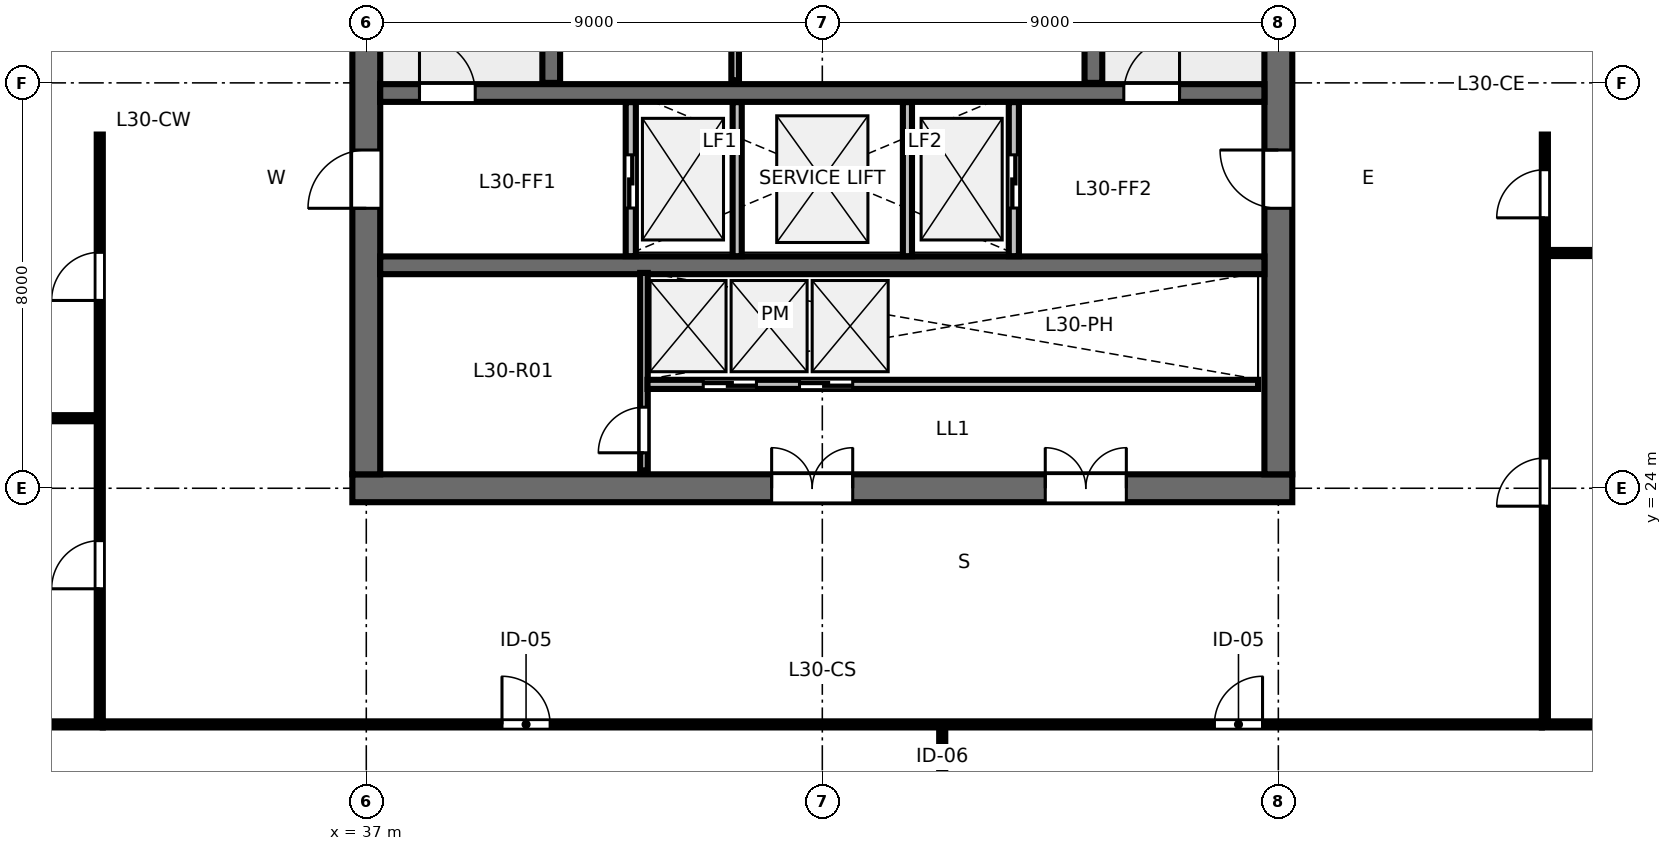
"""IFC4 building model, lengths in metres.
Left out: names, types, materials, properties, quantities, classifications, styles, units other than length and angle.
Written with IfcOpenShell. Run it as: python <this file> out.ifc"""

import sys

from ifc_helpers import new_model, si_unit, direction, frame, frame_2d, origin, place, context, subcontext, project, spatial, rectangle, extrude, element, fill, save


model = new_model("IFC4")
c1 = context("Model", 3, precision=1e-05, world=origin(), true_north=direction((0.0, 1.0)))
c2 = subcontext(c1, "Body", "Model", "MODEL_VIEW")
j1 = project(units=[si_unit("LENGTHUNIT", "METRE"), si_unit("PLANEANGLEUNIT", "RADIAN")], contexts=[c1])
p1 = place(None, origin())
s1 = spatial("IfcSite", under=j1, at=p1, CompositionType="ELEMENT")
p2 = place(p1, origin())
s2 = spatial("IfcBuilding", under=s1, at=p2, CompositionType="ELEMENT")
p3 = place(p2, frame((0.0, 0.0, 116.8)))
s3 = spatial("IfcBuildingStorey", under=s2, at=p3, CompositionType="ELEMENT", Elevation=116.8)
p4 = place(p3, frame((36.725, 24.0, 0.0), z_axis=(0.0, 0.0, 1.0), x_axis=(1.0, 0.0, 0.0)))
e1 = element("IfcWall", 1, at=p4, inside=s3, PredefinedType="SHEAR", context=c2, shape_type="SweptSolid", body=[
    extrude(rectangle(XDim=18.55, YDim=0.55, at=frame_2d((9.275, 0.0))), origin(), (0.0, 0.0, 1.0), 3.36),
])
p5 = place(p4, frame((8.275, 0.0, 0.0)))
e2 = element("IfcOpeningElement", 2, at=p5, cuts=e1, PredefinedType="OPENING", context=c2, shape_type="SweptSolid", body=[
    extrude(rectangle(XDim=1.6, YDim=2.15, at=frame_2d((0.8, 1.075))), frame((0.0, 0.285, 0.0), z_axis=(0.0, -1.0, 0.0), x_axis=(1.0, 0.0, 0.0)), (0.0, 0.0, 1.0), 0.57),
])
p6 = place(p4, frame((13.675, 0.0, 0.0)))
e3 = element("IfcOpeningElement", 3, at=p6, cuts=e1, PredefinedType="OPENING", context=c2, shape_type="SweptSolid", body=[
    extrude(rectangle(XDim=1.6, YDim=2.15, at=frame_2d((0.8, 1.075))), frame((0.0, 0.285, 0.0), z_axis=(0.0, -1.0, 0.0), x_axis=(1.0, 0.0, 0.0)), (0.0, 0.0, 1.0), 0.57),
])
p7 = place(p3, frame((37.0, 24.275, 0.0), z_axis=(0.0, 0.0, 1.0), x_axis=(0.0, 1.0, 0.0)))
e4 = element("IfcWall", 4, at=p7, inside=s3, PredefinedType="SHEAR", context=c2, shape_type="SweptSolid", body=[
    extrude(rectangle(XDim=15.45, YDim=0.55, at=frame_2d((7.725, 0.0))), origin(), (0.0, 0.0, 1.0), 3.36),
])
p8 = place(p7, frame((5.25, 0.0, 0.0)))
e5 = element("IfcOpeningElement", 5, at=p8, cuts=e4, PredefinedType="OPENING", context=c2, shape_type="SweptSolid", body=[
    extrude(rectangle(XDim=1.15, YDim=2.15, at=frame_2d((0.575, 1.075))), frame((0.0, 0.285, 0.0), z_axis=(0.0, -1.0, 0.0), x_axis=(1.0, 0.0, 0.0)), (0.0, 0.0, 1.0), 0.57),
])
p9 = place(p3, frame((55.0, 24.275, 0.0), z_axis=(0.0, 0.0, 1.0), x_axis=(0.0, 1.0, 0.0)))
e6 = element("IfcWall", 6, at=p9, inside=s3, PredefinedType="SHEAR", context=c2, shape_type="SweptSolid", body=[
    extrude(rectangle(XDim=15.45, YDim=0.55, at=frame_2d((7.725, 0.0))), origin(), (0.0, 0.0, 1.0), 3.36),
])
p10 = place(p9, frame((5.25, 0.0, 0.0)))
e7 = element("IfcOpeningElement", 7, at=p10, cuts=e6, PredefinedType="OPENING", context=c2, shape_type="SweptSolid", body=[
    extrude(rectangle(XDim=1.15, YDim=2.15, at=frame_2d((0.575, 1.075))), frame((0.0, 0.285, 0.0), z_axis=(0.0, -1.0, 0.0), x_axis=(1.0, 0.0, 0.0)), (0.0, 0.0, 1.0), 0.57),
])
p11 = place(p3, frame((37.275, 31.8, 0.0), z_axis=(0.0, 0.0, 1.0), x_axis=(1.0, 0.0, 0.0)))
e8 = element("IfcWall", 8, at=p11, inside=s3, PredefinedType="SHEAR", context=c2, shape_type="SweptSolid", body=[
    extrude(rectangle(XDim=17.45, YDim=0.35, at=frame_2d((8.725, 0.0))), origin(), (0.0, 0.0, 1.0), 3.36),
])
p12 = place(p11, frame((0.775, 0.0, 0.0)))
e9 = element("IfcOpeningElement", 9, at=p12, cuts=e8, PredefinedType="OPENING", context=c2, shape_type="SweptSolid", body=[
    extrude(rectangle(XDim=1.1, YDim=2.15, at=frame_2d((0.55, 1.075))), frame((0.0, 0.185, 0.0), z_axis=(0.0, -1.0, 0.0), x_axis=(1.0, 0.0, 0.0)), (0.0, 0.0, 1.0), 0.37),
])
p13 = place(p11, frame((14.675, 0.0, 0.0)))
e10 = element("IfcOpeningElement", 10, at=p13, cuts=e8, PredefinedType="OPENING", context=c2, shape_type="SweptSolid", body=[
    extrude(rectangle(XDim=1.1, YDim=2.15, at=frame_2d((0.55, 1.075))), frame((0.0, 0.185, 0.0), z_axis=(0.0, -1.0, 0.0), x_axis=(1.0, 0.0, 0.0)), (0.0, 0.0, 1.0), 0.37),
])
p14 = place(p3, frame((37.275, 28.4, 0.0), z_axis=(0.0, 0.0, 1.0), x_axis=(1.0, 0.0, 0.0)))
e11 = element("IfcWall", 11, at=p14, inside=s3, PredefinedType="SHEAR", context=c2, shape_type="SweptSolid", body=[
    extrude(rectangle(XDim=17.45, YDim=0.35, at=frame_2d((8.725, 0.0))), origin(), (0.0, 0.0, 1.0), 3.36),
])
for number, where, z_axis, x_axis in (
    (12, (40.65, 32.0, 0.0), (0.0, 0.0, 1.0), (0.0, 1.0, 0.0)),
    (13, (51.35, 32.0, 0.0), (0.0, 0.0, 1.0), (0.0, 1.0, 0.0)),
):
    element("IfcWall", number, at=place(p3, frame(where, z_axis=z_axis, x_axis=x_axis)), inside=s3, PredefinedType="SHEAR", context=c2, shape_type="SweptSolid", body=[
        extrude(rectangle(XDim=7.7, YDim=0.35, at=frame_2d((3.85, 0.0))), origin(), (0.0, 0.0, 1.0), 3.6),
    ])
p15 = place(p3, frame((44.28, 32.05, 0.0), z_axis=(0.0, 0.0, 1.0), x_axis=(0.0, 1.0, 0.0)))
e14 = element("IfcWall", 14, at=p15, inside=s3, PredefinedType="PARTITIONING", context=c2, shape_type="SweptSolid", body=[
    extrude(rectangle(XDim=3.67, YDim=0.15, at=frame_2d((1.835, 0.0))), origin(), (0.0, 0.0, 1.0), 3.36),
])
p16 = place(p15, frame((1.35, 0.0, 0.0)))
e15 = element("IfcOpeningElement", 15, at=p16, cuts=e14, PredefinedType="OPENING", context=c2, shape_type="SweptSolid", body=[
    extrude(rectangle(XDim=0.92, YDim=2.15, at=frame_2d((0.46, 1.075))), frame((0.0, 0.085, 0.0), z_axis=(0.0, -1.0, 0.0), x_axis=(1.0, 0.0, 0.0)), (0.0, 0.0, 1.0), 0.17),
])
p17 = place(p3, frame((42.22, 28.58, 0.0), z_axis=(0.0, 0.0, 1.0), x_axis=(0.0, 1.0, 0.0)))
e16 = element("IfcWall", 16, at=p17, inside=s3, PredefinedType="PARTITIONING", context=c2, shape_type="SweptSolid", body=[
    extrude(rectangle(XDim=3.04, YDim=0.2, at=frame_2d((1.52, 0.0))), origin(), (0.0, 0.0, 1.0), 3.36),
])
p18 = place(p17, frame((0.95, 0.0, 0.0)))
e17 = element("IfcOpeningElement", 17, at=p18, cuts=e16, PredefinedType="OPENING", context=c2, shape_type="SweptSolid", body=[
    extrude(rectangle(XDim=1.05, YDim=2.15, at=frame_2d((0.525, 1.075))), frame((0.0, 0.11, 0.0), z_axis=(0.0, -1.0, 0.0), x_axis=(1.0, 0.0, 0.0)), (0.0, 0.0, 1.0), 0.22),
])
p19 = place(p3, frame((49.78, 28.58, 0.0), z_axis=(0.0, 0.0, 1.0), x_axis=(0.0, 1.0, 0.0)))
e18 = element("IfcWall", 18, at=p19, inside=s3, PredefinedType="PARTITIONING", context=c2, shape_type="SweptSolid", body=[
    extrude(rectangle(XDim=3.04, YDim=0.2, at=frame_2d((1.52, 0.0))), origin(), (0.0, 0.0, 1.0), 3.36),
])
p20 = place(p19, frame((0.95, 0.0, 0.0)))
e19 = element("IfcOpeningElement", 19, at=p20, cuts=e18, PredefinedType="OPENING", context=c2, shape_type="SweptSolid", body=[
    extrude(rectangle(XDim=1.05, YDim=2.15, at=frame_2d((0.525, 1.075))), frame((0.0, 0.11, 0.0), z_axis=(0.0, -1.0, 0.0), x_axis=(1.0, 0.0, 0.0)), (0.0, 0.0, 1.0), 0.22),
])
for number, where, z_axis, x_axis in (
    (20, (44.32, 28.58, 0.0), (0.0, 0.0, 1.0), (0.0, 1.0, 0.0)),
    (21, (47.68, 28.58, 0.0), (0.0, 0.0, 1.0), (0.0, 1.0, 0.0)),
):
    element("IfcWall", number, at=place(p3, frame(where, z_axis=z_axis, x_axis=x_axis)), inside=s3, PredefinedType="PARTITIONING", context=c2, shape_type="SweptSolid", body=[
        extrude(rectangle(XDim=3.04, YDim=0.18, at=frame_2d((1.52, 0.0))), origin(), (0.0, 0.0, 1.0), 3.36),
    ])
p21 = place(p3, frame((42.48, 24.35, 0.0), z_axis=(0.0, 0.0, 1.0), x_axis=(0.0, 1.0, 0.0)))
e22 = element("IfcWall", 22, at=p21, inside=s3, PredefinedType="PARTITIONING", context=c2, shape_type="SweptSolid", body=[
    extrude(rectangle(XDim=3.9, YDim=0.15, at=frame_2d((1.95, 0.0))), origin(), (0.0, 0.0, 1.0), 3.36),
])
p22 = place(p21, frame((0.35, 0.0, 0.0)))
e23 = element("IfcOpeningElement", 23, at=p22, cuts=e22, PredefinedType="OPENING", context=c2, shape_type="SweptSolid", body=[
    extrude(rectangle(XDim=0.9, YDim=2.15, at=frame_2d((0.45, 1.075))), frame((0.0, 0.085, 0.0), z_axis=(0.0, -1.0, 0.0), x_axis=(1.0, 0.0, 0.0)), (0.0, 0.0, 1.0), 0.17),
])
p23 = place(p3, frame((42.55, 26.05, 0.0), z_axis=(0.0, 0.0, 1.0), x_axis=(1.0, 0.0, 0.0)))
e24 = element("IfcWall", 24, at=p23, inside=s3, PredefinedType="PARTITIONING", context=c2, shape_type="SweptSolid", body=[
    extrude(rectangle(XDim=12.05, YDim=0.18, at=frame_2d((6.025, 0.0))), origin(), (0.0, 0.0, 1.0), 3.36),
])
p24 = place(p23, frame((1.1, 0.0, 0.0)))
e25 = element("IfcOpeningElement", 25, at=p24, cuts=e24, PredefinedType="OPENING", context=c2, shape_type="SweptSolid", body=[
    extrude(rectangle(XDim=1.05, YDim=2.15, at=frame_2d((0.525, 1.075))), frame((0.0, 0.1, 0.0), z_axis=(0.0, -1.0, 0.0), x_axis=(1.0, 0.0, 0.0)), (0.0, 0.0, 1.0), 0.2),
])
p25 = place(p23, frame((3.0, 0.0, 0.0)))
e26 = element("IfcOpeningElement", 26, at=p25, cuts=e24, PredefinedType="OPENING", context=c2, shape_type="SweptSolid", body=[
    extrude(rectangle(XDim=1.05, YDim=2.15, at=frame_2d((0.525, 1.075))), frame((0.0, 0.1, 0.0), z_axis=(0.0, -1.0, 0.0), x_axis=(1.0, 0.0, 0.0)), (0.0, 0.0, 1.0), 0.2),
])
p26 = place(p3, frame((48.366, 19.34, 0.0), z_axis=(0.0, 0.0, 1.0), x_axis=(0.0, -1.0, 0.0)))
e27 = element("IfcWall", 27, at=p26, inside=s3, PredefinedType="PARTITIONING", context=c2, shape_type="SweptSolid", body=[
    extrude(rectangle(XDim=6.96, YDim=0.12, at=frame_2d((3.48, 0.0))), origin(), (0.0, 0.0, 1.0), 2.64),
])
p27 = place(p26, frame((1.4, 0.0, 0.0)))
e28 = element("IfcOpeningElement", 28, at=p27, cuts=e27, PredefinedType="OPENING", context=c2, shape_type="SweptSolid", body=[
    extrude(rectangle(XDim=0.9, YDim=2.15, at=frame_2d((0.45, 1.075))), frame((0.0, 0.07, 0.0), z_axis=(0.0, -1.0, 0.0), x_axis=(1.0, 0.0, 0.0)), (0.0, 0.0, 1.0), 0.14),
])
p28 = place(p3, frame((31.8, 19.34, 0.0), z_axis=(0.0, 0.0, 1.0), x_axis=(1.0, 0.0, 0.0)))
e29 = element("IfcWall", 29, at=p28, inside=s3, PredefinedType="PARTITIONING", context=c2, shape_type="SweptSolid", body=[
    extrude(rectangle(XDim=28.4, YDim=0.12, at=frame_2d((14.2, 0.0))), origin(), (0.0, 0.0, 1.0), 2.64),
])
p29 = place(p28, frame((7.878, 0.0, 0.0)))
e30 = element("IfcOpeningElement", 30, at=p29, cuts=e29, PredefinedType="OPENING", context=c2, shape_type="SweptSolid", body=[
    extrude(rectangle(XDim=0.95, YDim=2.15, at=frame_2d((0.475, 1.075))), frame((0.0, 0.07, 0.0), z_axis=(0.0, -1.0, 0.0), x_axis=(1.0, 0.0, 0.0)), (0.0, 0.0, 1.0), 0.14),
])
p30 = place(p28, frame((21.938, 0.0, 0.0)))
e31 = element("IfcOpeningElement", 31, at=p30, cuts=e29, PredefinedType="OPENING", context=c2, shape_type="SweptSolid", body=[
    extrude(rectangle(XDim=0.95, YDim=2.15, at=frame_2d((0.475, 1.075))), frame((0.0, 0.07, 0.0), z_axis=(0.0, -1.0, 0.0), x_axis=(1.0, 0.0, 0.0)), (0.0, 0.0, 1.0), 0.14),
])
p31 = place(p3, frame((31.74, 25.383, 0.0), z_axis=(0.0, 0.0, 1.0), x_axis=(-1.0, 0.0, 0.0)))
e32 = element("IfcWall", 32, at=p31, inside=s3, PredefinedType="PARTITIONING", context=c2, shape_type="SweptSolid", body=[
    extrude(rectangle(XDim=7.96, YDim=0.12, at=frame_2d((3.98, 0.0))), origin(), (0.0, 0.0, 1.0), 2.64),
])
p32 = place(p31, frame((1.4, 0.0, 0.0)))
e33 = element("IfcOpeningElement", 33, at=p32, cuts=e32, PredefinedType="OPENING", context=c2, shape_type="SweptSolid", body=[
    extrude(rectangle(XDim=0.9, YDim=2.15, at=frame_2d((0.45, 1.075))), frame((0.0, 0.07, 0.0), z_axis=(0.0, -1.0, 0.0), x_axis=(1.0, 0.0, 0.0)), (0.0, 0.0, 1.0), 0.14),
])
p33 = place(p3, frame((31.74, 19.4, 0.0), z_axis=(0.0, 0.0, 1.0), x_axis=(0.0, 1.0, 0.0)))
e34 = element("IfcWall", 34, at=p33, inside=s3, PredefinedType="PARTITIONING", context=c2, shape_type="SweptSolid", body=[
    extrude(rectangle(XDim=11.58, YDim=0.12, at=frame_2d((5.79, 0.0))), origin(), (0.0, 0.0, 1.0), 2.64),
])
p34 = place(p33, frame((2.616, 0.0, 0.0)))
e35 = element("IfcOpeningElement", 35, at=p34, cuts=e34, PredefinedType="OPENING", context=c2, shape_type="SweptSolid", body=[
    extrude(rectangle(XDim=0.95, YDim=2.15, at=frame_2d((0.475, 1.075))), frame((0.0, 0.07, 0.0), z_axis=(0.0, -1.0, 0.0), x_axis=(1.0, 0.0, 0.0)), (0.0, 0.0, 1.0), 0.14),
])
p35 = place(p33, frame((8.306, 0.0, 0.0)))
e36 = element("IfcOpeningElement", 36, at=p35, cuts=e34, PredefinedType="OPENING", context=c2, shape_type="SweptSolid", body=[
    extrude(rectangle(XDim=0.95, YDim=2.15, at=frame_2d((0.475, 1.075))), frame((0.0, 0.07, 0.0), z_axis=(0.0, -1.0, 0.0), x_axis=(1.0, 0.0, 0.0)), (0.0, 0.0, 1.0), 0.14),
])
p36 = place(p3, frame((60.26, 28.643, 0.0), z_axis=(0.0, 0.0, 1.0), x_axis=(1.0, 0.0, 0.0)))
e37 = element("IfcWall", 37, at=p36, inside=s3, PredefinedType="PARTITIONING", context=c2, shape_type="SweptSolid", body=[
    extrude(rectangle(XDim=7.96, YDim=0.12, at=frame_2d((3.98, 0.0))), origin(), (0.0, 0.0, 1.0), 2.64),
])
p37 = place(p36, frame((1.4, 0.0, 0.0)))
e38 = element("IfcOpeningElement", 38, at=p37, cuts=e37, PredefinedType="OPENING", context=c2, shape_type="SweptSolid", body=[
    extrude(rectangle(XDim=0.9, YDim=2.15, at=frame_2d((0.45, 1.075))), frame((0.0, 0.07, 0.0), z_axis=(0.0, -1.0, 0.0), x_axis=(1.0, 0.0, 0.0)), (0.0, 0.0, 1.0), 0.14),
])
p38 = place(p3, frame((60.26, 19.4, 0.0), z_axis=(0.0, 0.0, 1.0), x_axis=(0.0, 1.0, 0.0)))
e39 = element("IfcWall", 39, at=p38, inside=s3, PredefinedType="PARTITIONING", context=c2, shape_type="SweptSolid", body=[
    extrude(rectangle(XDim=11.58, YDim=0.12, at=frame_2d((5.79, 0.0))), origin(), (0.0, 0.0, 1.0), 2.64),
])
p39 = place(p38, frame((4.246, 0.0, 0.0)))
e40 = element("IfcOpeningElement", 40, at=p39, cuts=e39, PredefinedType="OPENING", context=c2, shape_type="SweptSolid", body=[
    extrude(rectangle(XDim=0.95, YDim=2.15, at=frame_2d((0.475, 1.075))), frame((0.0, 0.07, 0.0), z_axis=(0.0, -1.0, 0.0), x_axis=(1.0, 0.0, 0.0)), (0.0, 0.0, 1.0), 0.14),
])
p40 = place(p38, frame((9.936, 0.0, 0.0)))
e41 = element("IfcOpeningElement", 41, at=p40, cuts=e39, PredefinedType="OPENING", context=c2, shape_type="SweptSolid", body=[
    extrude(rectangle(XDim=0.95, YDim=2.15, at=frame_2d((0.475, 1.075))), frame((0.0, 0.07, 0.0), z_axis=(0.0, -1.0, 0.0), x_axis=(1.0, 0.0, 0.0)), (0.0, 0.0, 1.0), 0.14),
])
for number, where, z_axis, x_axis in (
    (42, (31.8, 19.34, 0.0), (0.0, 0.0, 1.0), (-1.0, 0.0, 0.0)),
    (43, (60.2, 19.34, 0.0), (0.0, 0.0, 1.0), (1.0, 0.0, 0.0)),
):
    element("IfcWall", number, at=place(p3, frame(where, z_axis=z_axis, x_axis=x_axis)), inside=s3, PredefinedType="PARTITIONING", context=c2, shape_type="SweptSolid", body=[
        extrude(rectangle(XDim=8.02, YDim=0.12, at=frame_2d((4.01, 0.0))), origin(), (0.0, 0.0, 1.0), 2.64),
    ])
p41 = place(p12, origin())
e44 = element("IfcDoor", 44, at=p41, inside=s3, OperationType="SINGLE_SWING_LEFT", PredefinedType="DOOR", context=c2, shape_type="SweptSolid", body=[
    extrude(rectangle(XDim=1.1, YDim=2.15, at=frame_2d((0.55, 1.075))), frame((0.0, 0.025, 0.0), z_axis=(0.0, -1.0, 0.0), x_axis=(1.0, 0.0, 0.0)), (0.0, 0.0, 1.0), 0.05),
])
fill(e9, e44)
p42 = place(p13, origin())
e45 = element("IfcDoor", 45, at=p42, inside=s3, OperationType="SINGLE_SWING_RIGHT", PredefinedType="DOOR", context=c2, shape_type="SweptSolid", body=[
    extrude(rectangle(XDim=1.1, YDim=2.15, at=frame_2d((0.55, 1.075))), frame((0.0, 0.025, 0.0), z_axis=(0.0, -1.0, 0.0), x_axis=(1.0, 0.0, 0.0)), (0.0, 0.0, 1.0), 0.05),
])
fill(e10, e45)
p43 = place(p8, origin())
e46 = element("IfcDoor", 46, at=p43, inside=s3, OperationType="SINGLE_SWING_LEFT", PredefinedType="DOOR", context=c2, shape_type="SweptSolid", body=[
    extrude(rectangle(XDim=1.15, YDim=2.15, at=frame_2d((0.575, 1.075))), frame((0.0, 0.025, 0.0), z_axis=(0.0, -1.0, 0.0), x_axis=(1.0, 0.0, 0.0)), (0.0, 0.0, 1.0), 0.05),
])
fill(e5, e46)
p44 = place(p10, origin())
e47 = element("IfcDoor", 47, at=p44, inside=s3, OperationType="SINGLE_SWING_RIGHT", PredefinedType="DOOR", context=c2, shape_type="SweptSolid", body=[
    extrude(rectangle(XDim=1.15, YDim=2.15, at=frame_2d((0.575, 1.075))), frame((0.0, 0.025, 0.0), z_axis=(0.0, -1.0, 0.0), x_axis=(1.0, 0.0, 0.0)), (0.0, 0.0, 1.0), 0.05),
])
fill(e7, e47)
p45 = place(p5, origin())
e48 = element("IfcDoor", 48, at=p45, inside=s3, OperationType="DOUBLE_DOOR_SINGLE_SWING", PredefinedType="DOOR", context=c2, shape_type="SweptSolid", body=[
    extrude(rectangle(XDim=1.6, YDim=2.15, at=frame_2d((0.8, 1.075))), frame((0.0, 0.025, 0.0), z_axis=(0.0, -1.0, 0.0), x_axis=(1.0, 0.0, 0.0)), (0.0, 0.0, 1.0), 0.05),
])
fill(e2, e48)
p46 = place(p6, origin())
e49 = element("IfcDoor", 49, at=p46, inside=s3, OperationType="DOUBLE_DOOR_SINGLE_SWING", PredefinedType="DOOR", context=c2, shape_type="SweptSolid", body=[
    extrude(rectangle(XDim=1.6, YDim=2.15, at=frame_2d((0.8, 1.075))), frame((0.0, 0.025, 0.0), z_axis=(0.0, -1.0, 0.0), x_axis=(1.0, 0.0, 0.0)), (0.0, 0.0, 1.0), 0.05),
])
fill(e3, e49)
p47 = place(p18, origin())
e50 = element("IfcDoor", 50, at=p47, inside=s3, OperationType="SLIDING_TO_LEFT", PredefinedType="DOOR", context=c2, shape_type="SweptSolid", body=[
    extrude(rectangle(XDim=1.05, YDim=2.15, at=frame_2d((0.525, 1.075))), frame((0.0, 0.025, 0.0), z_axis=(0.0, -1.0, 0.0), x_axis=(1.0, 0.0, 0.0)), (0.0, 0.0, 1.0), 0.05),
])
fill(e17, e50)
p48 = place(p20, origin())
e51 = element("IfcDoor", 51, at=p48, inside=s3, OperationType="SLIDING_TO_RIGHT", PredefinedType="DOOR", context=c2, shape_type="SweptSolid", body=[
    extrude(rectangle(XDim=1.05, YDim=2.15, at=frame_2d((0.525, 1.075))), frame((0.0, 0.025, 0.0), z_axis=(0.0, -1.0, 0.0), x_axis=(1.0, 0.0, 0.0)), (0.0, 0.0, 1.0), 0.05),
])
fill(e19, e51)
p49 = place(p22, origin())
e52 = element("IfcDoor", 52, at=p49, inside=s3, OperationType="SINGLE_SWING_LEFT", PredefinedType="DOOR", context=c2, shape_type="SweptSolid", body=[
    extrude(rectangle(XDim=0.9, YDim=2.15, at=frame_2d((0.45, 1.075))), frame((0.0, 0.025, 0.0), z_axis=(0.0, -1.0, 0.0), x_axis=(1.0, 0.0, 0.0)), (0.0, 0.0, 1.0), 0.05),
])
fill(e23, e52)
p50 = place(p24, origin())
e53 = element("IfcDoor", 53, at=p50, inside=s3, OperationType="SLIDING_TO_LEFT", PredefinedType="DOOR", context=c2, shape_type="SweptSolid", body=[
    extrude(rectangle(XDim=1.05, YDim=2.15, at=frame_2d((0.525, 1.075))), frame((0.0, 0.025, 0.0), z_axis=(0.0, -1.0, 0.0), x_axis=(1.0, 0.0, 0.0)), (0.0, 0.0, 1.0), 0.05),
])
fill(e25, e53)
p51 = place(p25, origin())
e54 = element("IfcDoor", 54, at=p51, inside=s3, OperationType="SLIDING_TO_RIGHT", PredefinedType="DOOR", context=c2, shape_type="SweptSolid", body=[
    extrude(rectangle(XDim=1.05, YDim=2.15, at=frame_2d((0.525, 1.075))), frame((0.0, 0.025, 0.0), z_axis=(0.0, -1.0, 0.0), x_axis=(1.0, 0.0, 0.0)), (0.0, 0.0, 1.0), 0.05),
])
fill(e26, e54)
p52 = place(p29, origin())
e55 = element("IfcDoor", 55, at=p52, inside=s3, OperationType="SINGLE_SWING_LEFT", PredefinedType="DOOR", context=c2, shape_type="SweptSolid", body=[
    extrude(rectangle(XDim=0.95, YDim=2.15, at=frame_2d((0.475, 1.075))), frame((0.0, 0.025, 0.0), z_axis=(0.0, -1.0, 0.0), x_axis=(1.0, 0.0, 0.0)), (0.0, 0.0, 1.0), 0.05),
])
fill(e30, e55)
p53 = place(p30, origin())
e56 = element("IfcDoor", 56, at=p53, inside=s3, OperationType="SINGLE_SWING_RIGHT", PredefinedType="DOOR", context=c2, shape_type="SweptSolid", body=[
    extrude(rectangle(XDim=0.95, YDim=2.15, at=frame_2d((0.475, 1.075))), frame((0.0, 0.025, 0.0), z_axis=(0.0, -1.0, 0.0), x_axis=(1.0, 0.0, 0.0)), (0.0, 0.0, 1.0), 0.05),
])
fill(e31, e56)
p54 = place(p34, origin())
e57 = element("IfcDoor", 57, at=p54, inside=s3, OperationType="SINGLE_SWING_LEFT", PredefinedType="DOOR", context=c2, shape_type="SweptSolid", body=[
    extrude(rectangle(XDim=0.95, YDim=2.15, at=frame_2d((0.475, 1.075))), frame((0.0, 0.025, 0.0), z_axis=(0.0, -1.0, 0.0), x_axis=(1.0, 0.0, 0.0)), (0.0, 0.0, 1.0), 0.05),
])
fill(e35, e57)
p55 = place(p35, origin())
e58 = element("IfcDoor", 58, at=p55, inside=s3, OperationType="SINGLE_SWING_LEFT", PredefinedType="DOOR", context=c2, shape_type="SweptSolid", body=[
    extrude(rectangle(XDim=0.95, YDim=2.15, at=frame_2d((0.475, 1.075))), frame((0.0, 0.025, 0.0), z_axis=(0.0, -1.0, 0.0), x_axis=(1.0, 0.0, 0.0)), (0.0, 0.0, 1.0), 0.05),
])
fill(e36, e58)
p56 = place(p39, origin())
e59 = element("IfcDoor", 59, at=p56, inside=s3, OperationType="SINGLE_SWING_LEFT", PredefinedType="DOOR", context=c2, shape_type="SweptSolid", body=[
    extrude(rectangle(XDim=0.95, YDim=2.15, at=frame_2d((0.475, 1.075))), frame((0.0, 0.025, 0.0), z_axis=(0.0, -1.0, 0.0), x_axis=(1.0, 0.0, 0.0)), (0.0, 0.0, 1.0), 0.05),
])
fill(e40, e59)
p57 = place(p40, origin())
e60 = element("IfcDoor", 60, at=p57, inside=s3, OperationType="SINGLE_SWING_LEFT", PredefinedType="DOOR", context=c2, shape_type="SweptSolid", body=[
    extrude(rectangle(XDim=0.95, YDim=2.15, at=frame_2d((0.475, 1.075))), frame((0.0, 0.025, 0.0), z_axis=(0.0, -1.0, 0.0), x_axis=(1.0, 0.0, 0.0)), (0.0, 0.0, 1.0), 0.05),
])
fill(e41, e60)
save(model, sys.argv[1])
